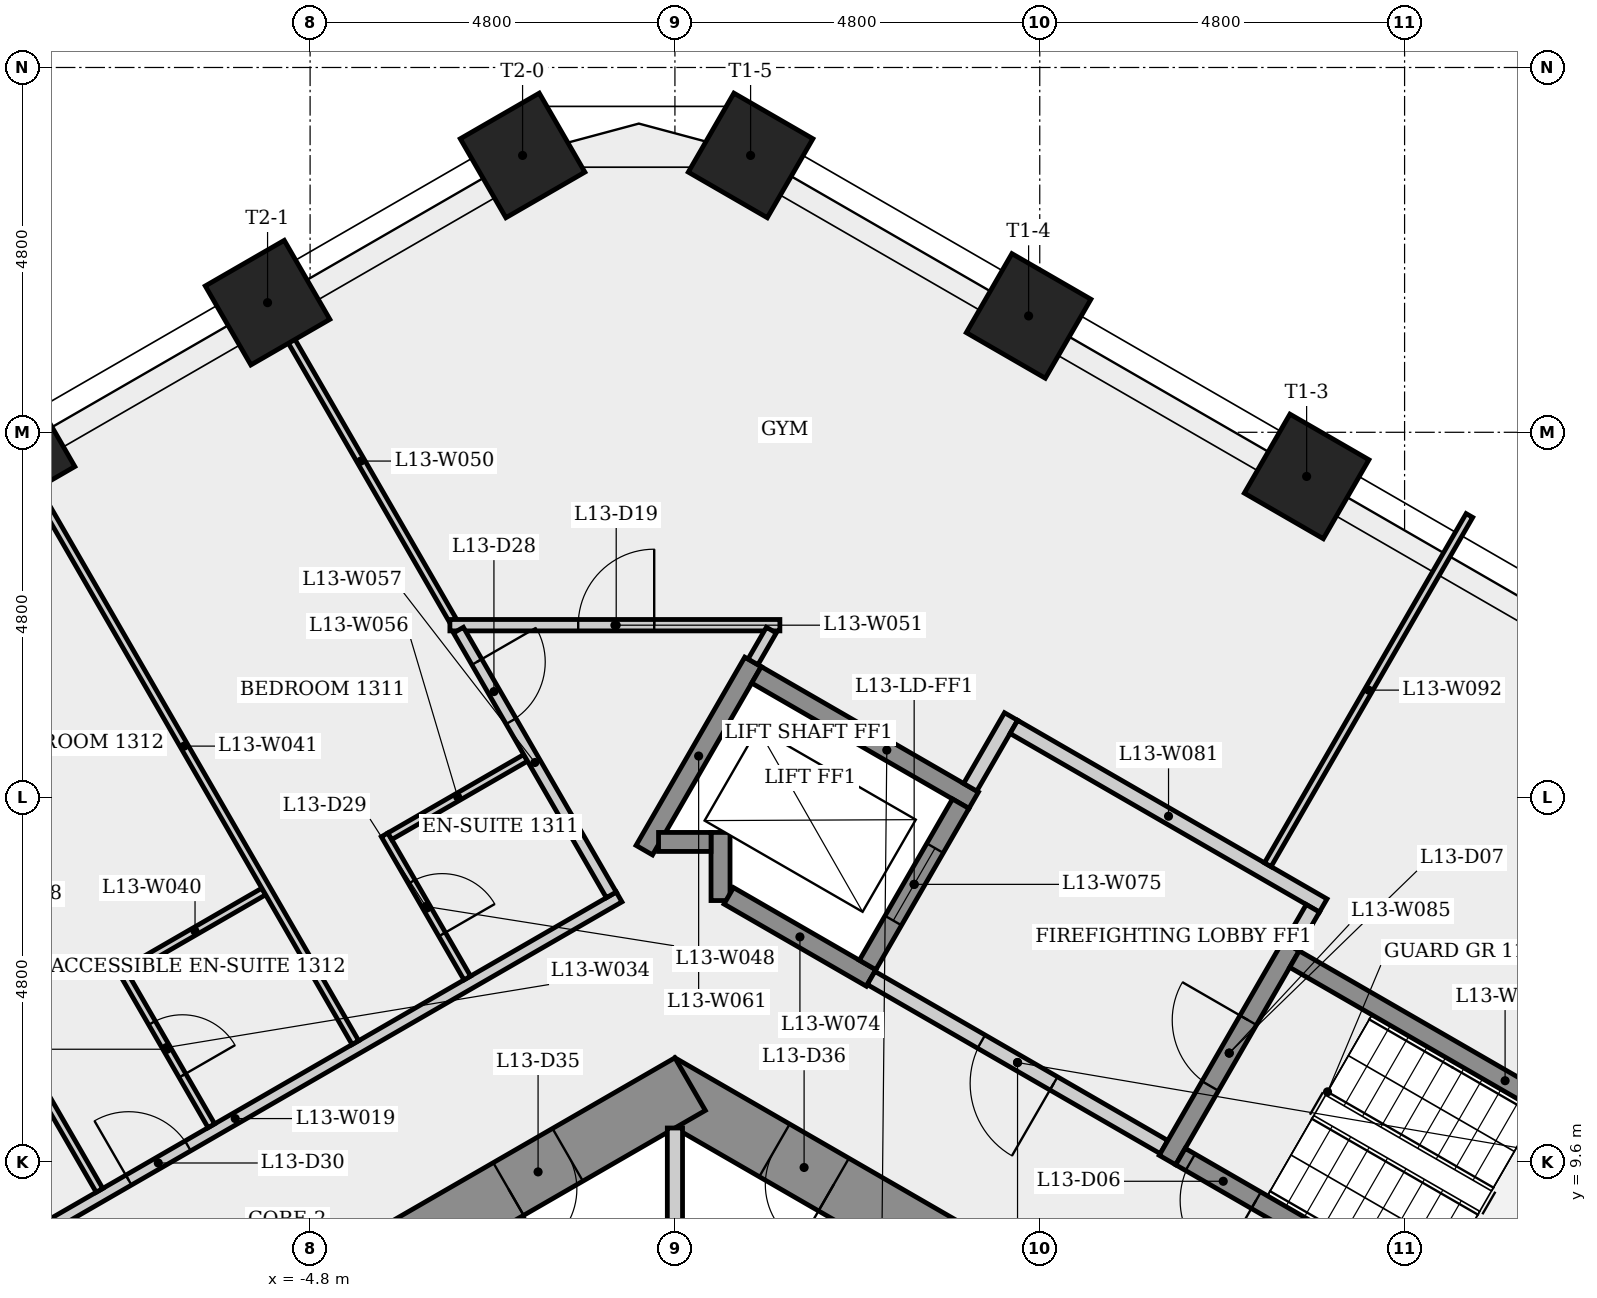
"""IFC4 building model, lengths in metres.
Left out: names, types, materials, properties, quantities, classifications, styles, units other than length and angle.
Written with IfcOpenShell. Run it as: python <this file> out.ifc"""

import sys

from ifc_helpers import new_model, si_unit, direction, frame, frame_2d, origin, origin_2d, place, context, subcontext, project, spatial, rectangle, extrude, element, fill, save


model = new_model("IFC4")
c1 = context("Model", 3, precision=1e-05, world=origin(), true_north=direction((0.0, 1.0)))
c2 = subcontext(c1, "Body", "Model", "MODEL_VIEW")
j1 = project(units=[si_unit("LENGTHUNIT", "METRE"), si_unit("PLANEANGLEUNIT", "RADIAN")], contexts=[c1])
p1 = place(None, origin())
s1 = spatial("IfcSite", under=j1, at=p1, CompositionType="ELEMENT")
p2 = place(p1, origin())
s2 = spatial("IfcBuilding", under=s1, at=p2, CompositionType="ELEMENT")
p3 = place(p2, frame((0.0, 0.0, 52.7)))
s3 = spatial("IfcBuildingStorey", under=s2, at=p3, CompositionType="ELEMENT", Elevation=52.7)
p4 = place(p3, frame((9.3, 5.138, 0.0), z_axis=(0.0, 0.0, 1.0), x_axis=(-0.866023993627, 0.500002442456, 0.0)))
e1 = element("IfcWall", 1, at=p4, inside=s3, PredefinedType="SHEAR", context=c2, shape_type="SweptSolid", body=[
    extrude(rectangle(XDim=10.97, YDim=0.8, at=frame_2d((5.485, 0.0))), origin(), (0.0, 0.0, 1.0), 3.4),
])
p5 = place(p4, frame((8.326, 0.0, 0.0)))
e2 = element("IfcOpeningElement", 2, at=p5, cuts=e1, PredefinedType="OPENING", context=c2, shape_type="SweptSolid", body=[
    extrude(rectangle(XDim=0.9, YDim=2.1, at=frame_2d((0.45, 1.05))), frame((0.0, 0.41, 0.0), z_axis=(0.0, -1.0, 0.0), x_axis=(1.0, 0.0, 0.0)), (0.0, 0.0, 1.0), 0.82),
])
p6 = place(p4, frame((2.091, 0.0, 0.0)))
e3 = element("IfcOpeningElement", 3, at=p6, cuts=e1, PredefinedType="OPENING", context=c2, shape_type="SweptSolid", body=[
    extrude(rectangle(XDim=0.9, YDim=2.1, at=frame_2d((0.45, 1.05))), frame((0.0, 0.41, 0.0), z_axis=(0.0, -1.0, 0.0), x_axis=(1.0, 0.0, 0.0)), (0.0, 0.0, 1.0), 0.82),
])
p7 = place(p3, frame((0.2, 10.623, 0.0), z_axis=(0.0, 0.0, 1.0), x_axis=(-0.866023993627, -0.500002442456, 0.0)))
e4 = element("IfcWall", 4, at=p7, inside=s3, PredefinedType="SHEAR", context=c2, shape_type="SweptSolid", body=[
    extrude(rectangle(XDim=10.97, YDim=0.8, at=frame_2d((5.485, 0.0))), origin(), (0.0, 0.0, 1.0), 3.4),
])
p8 = place(p7, frame((7.944, 0.0, 0.0)))
e5 = element("IfcOpeningElement", 5, at=p8, cuts=e4, PredefinedType="OPENING", context=c2, shape_type="SweptSolid", body=[
    extrude(rectangle(XDim=0.9, YDim=2.1, at=frame_2d((0.45, 1.05))), frame((0.0, 0.41, 0.0), z_axis=(0.0, -1.0, 0.0), x_axis=(1.0, 0.0, 0.0)), (0.0, 0.0, 1.0), 0.82),
])
p9 = place(p7, frame((1.86, 0.0, 0.0)))
e6 = element("IfcOpeningElement", 6, at=p9, cuts=e4, PredefinedType="OPENING", context=c2, shape_type="SweptSolid", body=[
    extrude(rectangle(XDim=0.9, YDim=2.1, at=frame_2d((0.45, 1.05))), frame((0.0, 0.41, 0.0), z_axis=(0.0, -1.0, 0.0), x_axis=(1.0, 0.0, 0.0)), (0.0, 0.0, 1.0), 0.82),
])
for number, where, z_axis, x_axis in (
    (7, (8.311, 18.619, 0.0), (0.0, 0.0, 1.0), (0.5, 0.866, 0.0)),
    (8, (4.653, 20.731, 0.0), (0.0, 0.0, 1.0), (0.5, 0.866, 0.0)),
    (9, (0.996, 22.843, 0.0), (0.0, 0.0, 1.0), (0.5, 0.866, 0.0)),
    (10, (-2.004, 22.843, 0.0), (0.0, 0.0, 1.0), (-0.5, 0.866, 0.0)),
    (11, (-5.36, 20.906, 0.0), (0.0, 0.0, 1.0), (-0.5, 0.866, 0.0)),
    (12, (-8.715, 18.969, 0.0), (0.0, 0.0, 1.0), (-0.5, 0.866, 0.0)),
):
    element("IfcColumn", number, at=place(p3, frame(where, z_axis=z_axis, x_axis=x_axis)), inside=s3, PredefinedType="COLUMN", context=c2, shape_type="SweptSolid", body=[
        extrude(rectangle(XDim=1.2, YDim=1.2, at=origin_2d()), origin(), (0.0, 0.0, 1.0), 3.4),
    ])
p10 = place(p3, frame((-10.836, 7.254, 0.0), z_axis=(0.0, 0.0, 1.0), x_axis=(0.866028032582, 0.499995446761, 0.0)))
e13 = element("IfcWall", 13, at=p10, inside=s3, PredefinedType="PARTITIONING", context=c2, shape_type="SweptSolid", body=[
    extrude(rectangle(XDim=11.664, YDim=0.15, at=frame_2d((5.832, 0.0))), origin(), (0.0, 0.0, 1.0), 3.05),
])
p11 = place(p10, frame((4.213, 0.0, 0.0)))
e14 = element("IfcOpeningElement", 14, at=p11, cuts=e13, PredefinedType="OPENING", context=c2, shape_type="SweptSolid", body=[
    extrude(rectangle(XDim=0.9, YDim=2.1, at=frame_2d((0.45, 1.05))), frame((0.0, 0.085, 0.0), z_axis=(0.0, -1.0, 0.0), x_axis=(1.0, 0.0, 0.0)), (0.0, 0.0, 1.0), 0.17),
])
p12 = place(p3, frame((-7.571, 9.226, 0.0), z_axis=(0.0, 0.0, 1.0), x_axis=(-0.499989081013, 0.866031707772, 0.0)))
e15 = element("IfcWall", 15, at=p12, inside=s3, PredefinedType="PARTITIONING", context=c2, shape_type="SweptSolid", body=[
    extrude(rectangle(XDim=9.01, YDim=0.1, at=frame_2d((4.505, 0.0))), origin(), (0.0, 0.0, 1.0), 3.05),
])
p13 = place(p3, frame((-7.286, 12.132, 0.0), z_axis=(0.0, 0.0, 1.0), x_axis=(0.499986429846, -0.866033238375, 0.0)))
e16 = element("IfcWall", 16, at=p13, inside=s3, PredefinedType="PARTITIONING", context=c2, shape_type="SweptSolid", body=[
    extrude(rectangle(XDim=2.375, YDim=0.1, at=frame_2d((1.188, 0.0))), origin(), (0.0, 0.0, 1.0), 3.05),
])
p14 = place(p13, frame((0.812, 0.0, 0.0)))
e17 = element("IfcOpeningElement", 17, at=p14, cuts=e16, PredefinedType="OPENING", context=c2, shape_type="SweptSolid", body=[
    extrude(rectangle(XDim=0.8, YDim=2.1, at=frame_2d((0.4, 1.05))), frame((0.0, 0.06, 0.0), z_axis=(0.0, -1.0, 0.0), x_axis=(1.0, 0.0, 0.0)), (0.0, 0.0, 1.0), 0.12),
])
p15 = place(p3, frame((-5.41, 13.158, 0.0), z_axis=(0.0, 0.0, 1.0), x_axis=(-0.866018117109, -0.50001262068, 0.0)))
e18 = element("IfcWall", 18, at=p15, inside=s3, PredefinedType="PARTITIONING", context=c2, shape_type="SweptSolid", body=[
    extrude(rectangle(XDim=2.088, YDim=0.1, at=frame_2d((1.044, 0.0))), origin(), (0.0, 0.0, 1.0), 3.05),
])
p16 = place(p3, frame((-8.709, 18.972, 0.0), z_axis=(0.0, 0.0, 1.0), x_axis=(0.499989081013, -0.866031707772, 0.0)))
e19 = element("IfcWall", 19, at=p16, inside=s3, PredefinedType="PARTITIONING", context=c2, shape_type="SweptSolid", body=[
    extrude(rectangle(XDim=9.01, YDim=0.1, at=frame_2d((4.505, 0.0))), origin(), (0.0, 0.0, 1.0), 3.05),
])
p17 = place(p3, frame((-3.819, 13.903, 0.0), z_axis=(0.0, 0.0, 1.0), x_axis=(0.500013916395, -0.866017369001, 0.0)))
e20 = element("IfcWall", 20, at=p17, inside=s3, PredefinedType="PARTITIONING", context=c2, shape_type="SweptSolid", body=[
    extrude(rectangle(XDim=2.175, YDim=0.1, at=frame_2d((1.088, 0.0))), origin(), (0.0, 0.0, 1.0), 3.05),
])
p18 = place(p17, frame((0.712, 0.0, 0.0)))
e21 = element("IfcOpeningElement", 21, at=p18, cuts=e20, PredefinedType="OPENING", context=c2, shape_type="SweptSolid", body=[
    extrude(rectangle(XDim=0.8, YDim=2.1, at=frame_2d((0.4, 1.05))), frame((0.0, 0.06, 0.0), z_axis=(0.0, -1.0, 0.0), x_axis=(1.0, 0.0, 0.0)), (0.0, 0.0, 1.0), 0.12),
])
p19 = place(p3, frame((-2.923, 16.727, 0.0), z_axis=(0.0, 0.0, 1.0), x_axis=(-0.500009339412, 0.866020011605, 0.0)))
e22 = element("IfcWall", 22, at=p19, inside=s3, PredefinedType="PARTITIONING", context=c2, shape_type="SweptSolid", body=[
    extrude(rectangle(XDim=4.837, YDim=0.1, at=frame_2d((2.419, 0.0))), origin(), (0.0, 0.0, 1.0), 3.05),
])
p20 = place(p3, frame((-2.961, 16.662, 0.0), z_axis=(0.0, 0.0, 1.0), x_axis=(1.0, 0.0, 0.0)))
e23 = element("IfcWall", 23, at=p20, inside=s3, PredefinedType="PARTITIONING", context=c2, shape_type="SweptSolid", body=[
    extrude(rectangle(XDim=4.342, YDim=0.15, at=frame_2d((2.171, 0.0))), origin(), (0.0, 0.0, 1.0), 3.05),
])
p21 = place(p20, frame((1.688, 0.0, 0.0)))
e24 = element("IfcOpeningElement", 24, at=p21, cuts=e23, PredefinedType="OPENING", context=c2, shape_type="SweptSolid", body=[
    extrude(rectangle(XDim=1.0, YDim=2.1, at=frame_2d((0.5, 1.05))), frame((0.0, 0.085, 0.0), z_axis=(0.0, -1.0, 0.0), x_axis=(1.0, 0.0, 0.0)), (0.0, 0.0, 1.0), 0.17),
])
p22 = place(p3, frame((-1.964, 14.916, 0.0), z_axis=(0.0, 0.0, 1.0), x_axis=(-0.866027928545, -0.499995626961, 0.0)))
e25 = element("IfcWall", 25, at=p22, inside=s3, PredefinedType="PARTITIONING", context=c2, shape_type="SweptSolid", body=[
    extrude(rectangle(XDim=2.063, YDim=0.1, at=frame_2d((1.031, 0.0))), origin(), (0.0, 0.0, 1.0), 3.05),
])
p23 = place(p3, frame((-2.848, 16.597, 0.0), z_axis=(0.0, 0.0, 1.0), x_axis=(0.500016677412, -0.866015774862, 0.0)))
e26 = element("IfcWall", 26, at=p23, inside=s3, PredefinedType="PARTITIONING", context=c2, shape_type="SweptSolid", body=[
    extrude(rectangle(XDim=4.022, YDim=0.15, at=frame_2d((2.011, 0.0))), origin(), (0.0, 0.0, 1.0), 3.05),
])
p24 = place(p23, frame((0.484, 0.0, 0.0)))
e27 = element("IfcOpeningElement", 27, at=p24, cuts=e26, PredefinedType="OPENING", context=c2, shape_type="SweptSolid", body=[
    extrude(rectangle(XDim=0.9, YDim=2.1, at=frame_2d((0.45, 1.05))), frame((0.0, 0.085, 0.0), z_axis=(0.0, -1.0, 0.0), x_axis=(1.0, 0.0, 0.0)), (0.0, 0.0, 1.0), 0.17),
])
p25 = place(p3, frame((-0.403, 13.702, 0.0), z_axis=(0.0, 0.0, 1.0), x_axis=(0.499976111731, 0.866039195244, 0.0)))
e28 = element("IfcWall", 28, at=p25, inside=s3, PredefinedType="SHEAR", context=c2, shape_type="SweptSolid", body=[
    extrude(rectangle(XDim=2.861, YDim=0.25, at=frame_2d((1.43, 0.0))), origin(), (0.0, 0.0, 1.0), 3.05),
])
p26 = place(p3, frame((0.0, 10.046, 0.0), z_axis=(0.0, 0.0, 1.0), x_axis=(0.0, -1.0, 0.0)))
e29 = element("IfcWall", 29, at=p26, inside=s3, PredefinedType="PARTITIONING", context=c2, shape_type="SweptSolid", body=[
    extrude(rectangle(XDim=4.771, YDim=0.2, at=frame_2d((2.385, 0.0))), origin(), (0.0, 0.0, 1.0), 3.05),
])
p27 = place(p3, frame((0.6, 13.039, 0.0), z_axis=(0.0, 0.0, 1.0), x_axis=(0.0, 1.0, 0.0)))
e30 = element("IfcWall", 30, at=p27, inside=s3, PredefinedType="SHEAR", context=c2, shape_type="SweptSolid", body=[
    extrude(rectangle(XDim=0.896, YDim=0.25, at=frame_2d((0.448, 0.0))), origin(), (0.0, 0.0, 1.0), 3.05),
])
p28 = place(p3, frame((0.475, 13.81, 0.0), z_axis=(0.0, 0.0, 1.0), x_axis=(-1.0, 0.0, 0.0)))
e31 = element("IfcWall", 31, at=p28, inside=s3, PredefinedType="SHEAR", context=c2, shape_type="SweptSolid", body=[
    extrude(rectangle(XDim=0.691, YDim=0.25, at=frame_2d((0.345, 0.0))), origin(), (0.0, 0.0, 1.0), 3.4),
])
p29 = place(p3, frame((1.073, 16.008, 0.0), z_axis=(0.0, 0.0, 1.0), x_axis=(0.866040211805, -0.499974350878, 0.0)))
e32 = element("IfcWall", 32, at=p29, inside=s3, PredefinedType="SHEAR", context=c2, shape_type="SweptSolid", body=[
    extrude(rectangle(XDim=3.3, YDim=0.25, at=frame_2d((1.65, 0.0))), origin(), (0.0, 0.0, 1.0), 3.05),
])
p30 = place(p3, frame((1.268, 16.597, 0.0), z_axis=(0.0, 0.0, 1.0), x_axis=(-0.500058339205, -0.865991719008, 0.0)))
e33 = element("IfcWall", 33, at=p30, inside=s3, PredefinedType="PARTITIONING", context=c2, shape_type="SweptSolid", body=[
    extrude(rectangle(XDim=0.482, YDim=0.15, at=frame_2d((0.241, 0.0))), origin(), (0.0, 0.0, 1.0), 3.05),
])
p31 = place(p3, frame((2.581, 12.02, 0.0), z_axis=(0.0, 0.0, 1.0), x_axis=(-0.86603892542, 0.499976579108, 0.0)))
e34 = element("IfcWall", 34, at=p31, inside=s3, PredefinedType="SHEAR", context=c2, shape_type="SweptSolid", body=[
    extrude(rectangle(XDim=2.162, YDim=0.25, at=frame_2d((1.081, 0.0))), origin(), (0.0, 0.0, 1.0), 3.05),
])
p32 = place(p3, frame((2.535, 12.191, 0.0), z_axis=(0.0, 0.0, 1.0), x_axis=(0.500061746146, 0.865989751695, 0.0)))
e35 = element("IfcWall", 35, at=p32, inside=s3, PredefinedType="SHEAR", context=c2, shape_type="SweptSolid", body=[
    extrude(rectangle(XDim=2.45, YDim=0.25, at=frame_2d((1.225, 0.0))), origin(), (0.0, 0.0, 1.0), 3.4),
])
p33 = place(p32, frame((0.675, 0.0, 0.0)))
e36 = element("IfcOpeningElement", 36, at=p33, cuts=e35, PredefinedType="OPENING", context=c2, shape_type="SweptSolid", body=[
    extrude(rectangle(XDim=1.1, YDim=2.1, at=frame_2d((0.55, 1.05))), frame((0.0, 0.135, 0.0), z_axis=(0.0, -1.0, 0.0), x_axis=(1.0, 0.0, 0.0)), (0.0, 0.0, 1.0), 0.27),
])
p34 = place(p3, frame((3.885, 14.529, 0.0), z_axis=(0.0, 0.0, 1.0), x_axis=(0.499997628298, 0.866026773083, 0.0)))
e37 = element("IfcWall", 37, at=p34, inside=s3, PredefinedType="PARTITIONING", context=c2, shape_type="SweptSolid", body=[
    extrude(rectangle(XDim=1.075, YDim=0.2, at=frame_2d((0.538, 0.0))), origin(), (0.0, 0.0, 1.0), 3.05),
])
p35 = place(p3, frame((4.459, 15.323, 0.0), z_axis=(0.0, 0.0, 1.0), x_axis=(0.866016039709, -0.500016218704, 0.0)))
e38 = element("IfcWall", 38, at=p35, inside=s3, PredefinedType="PARTITIONING", context=c2, shape_type="SweptSolid", body=[
    extrude(rectangle(XDim=4.7, YDim=0.2, at=frame_2d((2.35, 0.0))), origin(), (0.0, 0.0, 1.0), 3.05),
])
p36 = place(p3, frame((6.435, 9.795, 0.0), z_axis=(0.0, 0.0, 1.0), x_axis=(-0.866012907634, 0.500021643343, 0.0)))
e39 = element("IfcWall", 39, at=p36, inside=s3, PredefinedType="PARTITIONING", context=c2, shape_type="SweptSolid", body=[
    extrude(rectangle(XDim=4.45, YDim=0.2, at=frame_2d((2.225, 0.0))), origin(), (0.0, 0.0, 1.0), 3.05),
])
p37 = place(p36, frame((1.675, 0.0, 0.0)))
e40 = element("IfcOpeningElement", 40, at=p37, cuts=e39, PredefinedType="OPENING", context=c2, shape_type="SweptSolid", body=[
    extrude(rectangle(XDim=1.1, YDim=2.1, at=frame_2d((0.55, 1.05))), frame((0.0, 0.11, 0.0), z_axis=(0.0, -1.0, 0.0), x_axis=(1.0, 0.0, 0.0)), (0.0, 0.0, 1.0), 0.22),
])
p38 = place(p3, frame((6.48, 9.624, 0.0), z_axis=(0.0, 0.0, 1.0), x_axis=(0.500017246033, 0.866015446554, 0.0)))
e41 = element("IfcWall", 41, at=p38, inside=s3, PredefinedType="SHEAR", context=c2, shape_type="SweptSolid", body=[
    extrude(rectangle(XDim=3.25, YDim=0.25, at=frame_2d((1.625, 0.0))), origin(), (0.0, 0.0, 1.0), 3.05),
])
p39 = place(p38, frame((1.125, 0.0, 0.0)))
e42 = element("IfcOpeningElement", 42, at=p39, cuts=e41, PredefinedType="OPENING", context=c2, shape_type="SweptSolid", body=[
    extrude(rectangle(XDim=1.0, YDim=2.1, at=frame_2d((0.5, 1.05))), frame((0.0, 0.135, 0.0), z_axis=(0.0, -1.0, 0.0), x_axis=(1.0, 0.0, 0.0)), (0.0, 0.0, 1.0), 0.27),
])
p40 = place(p3, frame((7.8, 13.51, 0.0), z_axis=(0.0, 0.0, 1.0), x_axis=(0.499989321821, 0.866031568746, 0.0)))
e43 = element("IfcWall", 43, at=p40, inside=s3, PredefinedType="PARTITIONING", context=c2, shape_type="SweptSolid", body=[
    extrude(rectangle(XDim=5.306, YDim=0.1, at=frame_2d((2.653, 0.0))), origin(), (0.0, 0.0, 1.0), 3.05),
])
p41 = place(p3, frame((8.151, 12.268, 0.0), z_axis=(0.0, 0.0, 1.0), x_axis=(0.866025499775, -0.499999833739, 0.0)))
e44 = element("IfcWall", 44, at=p41, inside=s3, PredefinedType="SHEAR", context=c2, shape_type="SweptSolid", body=[
    extrude(rectangle(XDim=6.4, YDim=0.25, at=frame_2d((3.2, 0.0))), origin(), (0.0, 0.0, 1.0), 3.05),
])
p42 = place(p3, frame((8.393, 12.937, 0.0), z_axis=(0.0, 0.0, 1.0), x_axis=(-0.500065409566, -0.86598763626, 0.0)))
e45 = element("IfcWall", 45, at=p42, inside=s3, PredefinedType="PARTITIONING", context=c2, shape_type="SweptSolid", body=[
    extrude(rectangle(XDim=0.575, YDim=0.2, at=frame_2d((0.288, 0.0))), origin(), (0.0, 0.0, 1.0), 3.05),
])
p43 = place(p3, frame((12.194, 6.47, 0.0), z_axis=(0.0, 0.0, 1.0), x_axis=(-0.866025499775, 0.499999833739, 0.0)))
e46 = element("IfcWall", 46, at=p43, inside=s3, PredefinedType="SHEAR", context=c2, shape_type="SweptSolid", body=[
    extrude(rectangle(XDim=6.4, YDim=0.25, at=frame_2d((3.2, 0.0))), origin(), (0.0, 0.0, 1.0), 3.05),
])
p44 = place(p43, frame((5.25, 0.0, 0.0)))
e47 = element("IfcOpeningElement", 47, at=p44, cuts=e46, PredefinedType="OPENING", context=c2, shape_type="SweptSolid", body=[
    extrude(rectangle(XDim=1.0, YDim=2.1, at=frame_2d((0.5, 1.05))), frame((0.0, 0.135, 0.0), z_axis=(0.0, -1.0, 0.0), x_axis=(1.0, 0.0, 0.0)), (0.0, 0.0, 1.0), 0.27),
])
p45 = place(p44, origin())
e48 = element("IfcDoor", 48, at=p45, inside=s3, OperationType="SINGLE_SWING_LEFT", PredefinedType="DOOR", context=c2, shape_type="SweptSolid", body=[
    extrude(rectangle(XDim=1.0, YDim=2.1, at=frame_2d((0.5, 1.05))), frame((0.0, 0.025, 0.0), z_axis=(0.0, -1.0, 0.0), x_axis=(1.0, 0.0, 0.0)), (0.0, 0.0, 1.0), 0.05),
])
fill(e47, e48)
p46 = place(p39, origin())
e49 = element("IfcDoor", 49, at=p46, inside=s3, OperationType="SINGLE_SWING_RIGHT", PredefinedType="DOOR", context=c2, shape_type="SweptSolid", body=[
    extrude(rectangle(XDim=1.0, YDim=2.1, at=frame_2d((0.5, 1.05))), frame((0.0, 0.025, 0.0), z_axis=(0.0, -1.0, 0.0), x_axis=(1.0, 0.0, 0.0)), (0.0, 0.0, 1.0), 0.05),
])
fill(e42, e49)
p47 = place(p37, origin())
e50 = element("IfcDoor", 50, at=p47, inside=s3, OperationType="SINGLE_SWING_LEFT", PredefinedType="DOOR", context=c2, shape_type="SweptSolid", body=[
    extrude(rectangle(XDim=1.1, YDim=2.1, at=frame_2d((0.55, 1.05))), frame((0.0, 0.025, 0.0), z_axis=(0.0, -1.0, 0.0), x_axis=(1.0, 0.0, 0.0)), (0.0, 0.0, 1.0), 0.05),
])
fill(e40, e50)
p48 = place(p33, origin())
e51 = element("IfcDoor", 51, at=p48, inside=s3, OperationType="SLIDING_TO_LEFT", PredefinedType="DOOR", context=c2, shape_type="SweptSolid", body=[
    extrude(rectangle(XDim=1.1, YDim=2.1, at=frame_2d((0.55, 1.05))), frame((0.0, 0.025, 0.0), z_axis=(0.0, -1.0, 0.0), x_axis=(1.0, 0.0, 0.0)), (0.0, 0.0, 1.0), 0.05),
])
fill(e36, e51)
p49 = place(p21, origin())
e52 = element("IfcDoor", 52, at=p49, inside=s3, OperationType="SINGLE_SWING_RIGHT", PredefinedType="DOOR", context=c2, shape_type="SweptSolid", body=[
    extrude(rectangle(XDim=1.0, YDim=2.1, at=frame_2d((0.5, 1.05))), frame((0.0, 0.025, 0.0), z_axis=(0.0, -1.0, 0.0), x_axis=(1.0, 0.0, 0.0)), (0.0, 0.0, 1.0), 0.05),
])
fill(e24, e52)
p50 = place(p24, origin())
e53 = element("IfcDoor", 53, at=p50, inside=s3, OperationType="SINGLE_SWING_LEFT", PredefinedType="DOOR", context=c2, shape_type="SweptSolid", body=[
    extrude(rectangle(XDim=0.9, YDim=2.1, at=frame_2d((0.45, 1.05))), frame((0.0, 0.025, 0.0), z_axis=(0.0, -1.0, 0.0), x_axis=(1.0, 0.0, 0.0)), (0.0, 0.0, 1.0), 0.05),
])
fill(e27, e53)
p51 = place(p18, origin())
e54 = element("IfcDoor", 54, at=p51, inside=s3, OperationType="SINGLE_SWING_RIGHT", PredefinedType="DOOR", context=c2, shape_type="SweptSolid", body=[
    extrude(rectangle(XDim=0.8, YDim=2.1, at=frame_2d((0.4, 1.05))), frame((0.0, 0.025, 0.0), z_axis=(0.0, -1.0, 0.0), x_axis=(1.0, 0.0, 0.0)), (0.0, 0.0, 1.0), 0.05),
])
fill(e21, e54)
p52 = place(p11, origin())
e55 = element("IfcDoor", 55, at=p52, inside=s3, OperationType="SINGLE_SWING_LEFT", PredefinedType="DOOR", context=c2, shape_type="SweptSolid", body=[
    extrude(rectangle(XDim=0.9, YDim=2.1, at=frame_2d((0.45, 1.05))), frame((0.0, 0.025, 0.0), z_axis=(0.0, -1.0, 0.0), x_axis=(1.0, 0.0, 0.0)), (0.0, 0.0, 1.0), 0.05),
])
fill(e14, e55)
p53 = place(p14, origin())
e56 = element("IfcDoor", 56, at=p53, inside=s3, OperationType="SINGLE_SWING_RIGHT", PredefinedType="DOOR", context=c2, shape_type="SweptSolid", body=[
    extrude(rectangle(XDim=0.8, YDim=2.1, at=frame_2d((0.4, 1.05))), frame((0.0, 0.025, 0.0), z_axis=(0.0, -1.0, 0.0), x_axis=(1.0, 0.0, 0.0)), (0.0, 0.0, 1.0), 0.05),
])
fill(e17, e56)
p54 = place(p9, origin())
e57 = element("IfcDoor", 57, at=p54, inside=s3, OperationType="SINGLE_SWING_RIGHT", PredefinedType="DOOR", context=c2, shape_type="SweptSolid", body=[
    extrude(rectangle(XDim=0.9, YDim=2.1, at=frame_2d((0.45, 1.05))), frame((0.0, 0.025, 0.0), z_axis=(0.0, -1.0, 0.0), x_axis=(1.0, 0.0, 0.0)), (0.0, 0.0, 1.0), 0.05),
])
fill(e6, e57)
p55 = place(p5, origin())
e58 = element("IfcDoor", 58, at=p55, inside=s3, OperationType="SINGLE_SWING_LEFT", PredefinedType="DOOR", context=c2, shape_type="SweptSolid", body=[
    extrude(rectangle(XDim=0.9, YDim=2.1, at=frame_2d((0.45, 1.05))), frame((0.0, 0.025, 0.0), z_axis=(0.0, -1.0, 0.0), x_axis=(1.0, 0.0, 0.0)), (0.0, 0.0, 1.0), 0.05),
])
fill(e2, e58)
save(model, sys.argv[1])
